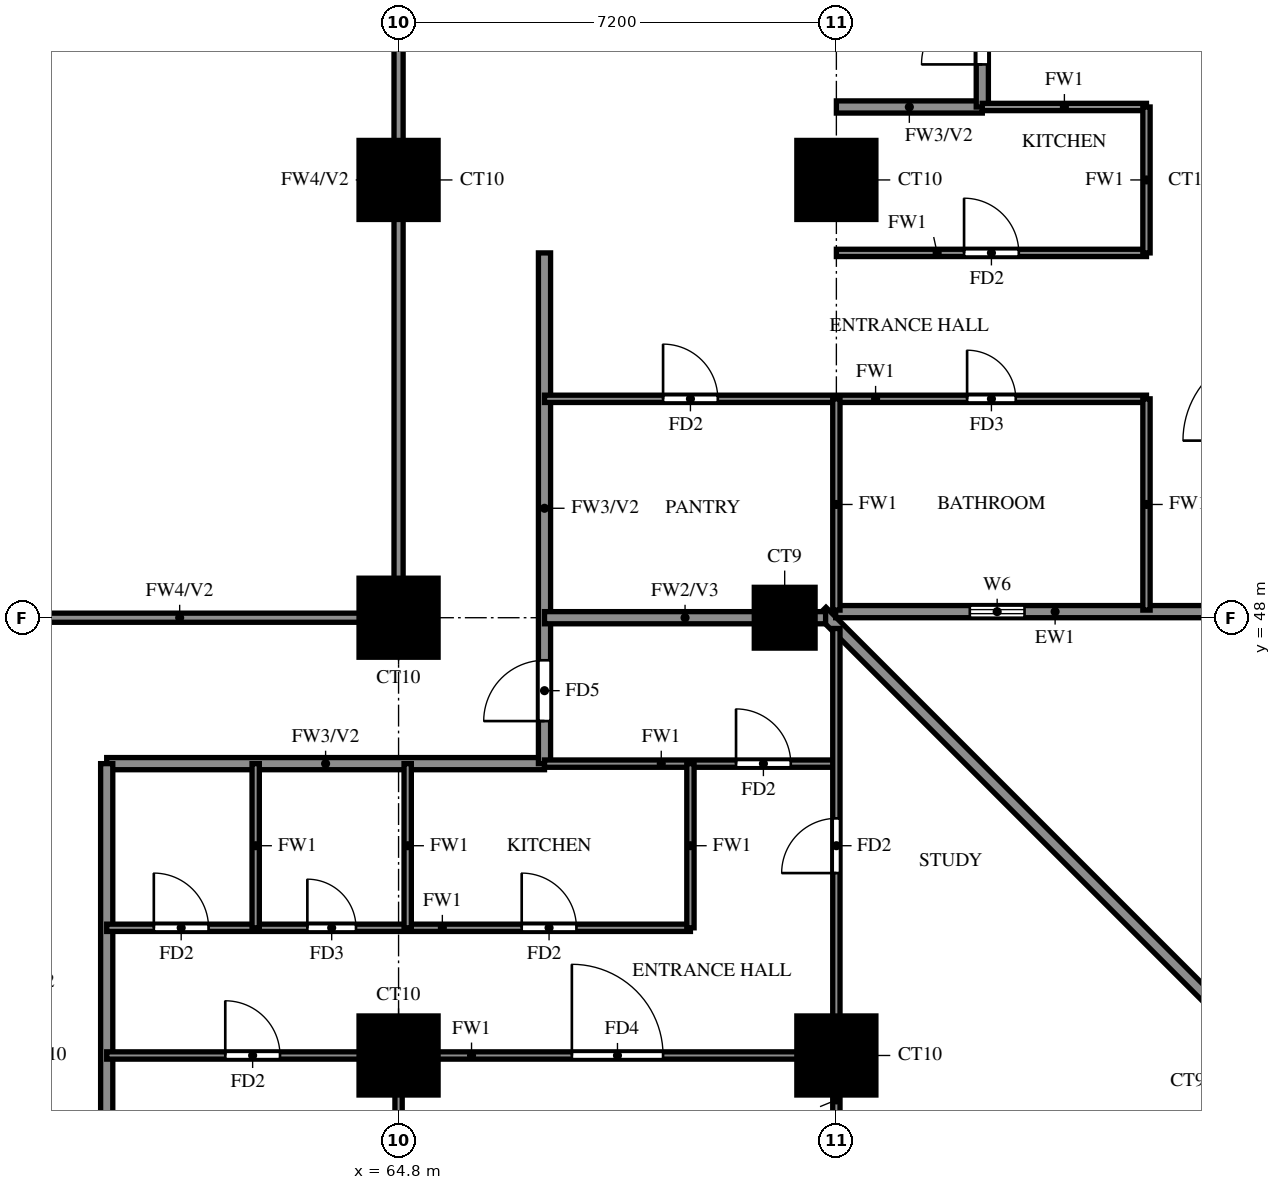
"""IFC4 building model, lengths in metres.
Left out: names, types, materials, properties, quantities, classifications, styles, units other than length and angle.
Written with IfcOpenShell. Run it as: python <this file> out.ifc"""

import sys

from ifc_helpers import new_model, si_unit, direction, frame, frame_2d, origin, origin_2d, place, context, subcontext, project, spatial, rectangle, extrude, source, transform, mapped, element, fill, save


model = new_model("IFC4")
c1 = context("Model", 3, precision=1e-05, world=origin(), true_north=direction((0.0, 1.0)))
c2 = subcontext(c1, "Body", "Model", "MODEL_VIEW")
j1 = project(units=[si_unit("LENGTHUNIT", "METRE"), si_unit("PLANEANGLEUNIT", "RADIAN")], contexts=[c1])
p1 = place(None, origin())
s1 = spatial("IfcSite", under=j1, at=p1, CompositionType="ELEMENT")
p2 = place(p1, origin())
s2 = spatial("IfcBuilding", under=s1, at=p2, CompositionType="ELEMENT")
p3 = place(p2, frame((0.0, 0.0, 83.0)))
s3 = spatial("IfcBuildingStorey", under=s2, at=p3, CompositionType="ELEMENT", Elevation=83.0)
m1 = source(origin(), c2, "Body", "SweptSolid", [
    extrude(rectangle(XDim=1.3, YDim=1.3, at=origin_2d()), origin(), (0.0, 0.0, 1.0), 3.18),
])
for number, where, z_axis, x_axis in (
    (1, (64.8, 40.8, 0.0), (0.0, 0.0, 1.0), (1.0, 0.0, 0.0)),
    (2, (72.0, 40.8, 0.0), (0.0, 0.0, 1.0), (1.0, 0.0, 0.0)),
    (3, (64.8, 48.0, 0.0), (0.0, 0.0, 1.0), (1.0, 0.0, 0.0)),
):
    element("IfcColumn", number, at=place(p3, frame(where, z_axis=z_axis, x_axis=x_axis)), inside=s3, PredefinedType="COLUMN", context=c2, shape_type="MappedRepresentation", body=[
        mapped(m1, transform((0.0, 0.0, 0.0))),
    ])
m2 = source(origin(), c2, "Body", "SweptSolid", [
    extrude(rectangle(XDim=1.0, YDim=1.0, at=origin_2d()), origin(), (0.0, 0.0, 1.0), 3.18),
])
p4 = place(p3, frame((71.15, 48.0, 0.0), z_axis=(0.0, 0.0, 1.0), x_axis=(1.0, 0.0, 0.0)))
e4 = element("IfcColumn", 4, at=p4, inside=s3, PredefinedType="COLUMN", context=c2, shape_type="MappedRepresentation", body=[
    mapped(m2, transform((0.0, 0.0, 0.0))),
])
for number, where, z_axis, x_axis in (
    (5, (64.8, 55.2, 0.0), (0.0, 0.0, 1.0), (1.0, 0.0, 0.0)),
    (6, (72.0, 55.2, 0.0), (0.0, 0.0, 1.0), (1.0, 0.0, 0.0)),
):
    element("IfcColumn", number, at=place(p3, frame(where, z_axis=z_axis, x_axis=x_axis)), inside=s3, PredefinedType="COLUMN", context=c2, shape_type="MappedRepresentation", body=[
        mapped(m1, transform((0.0, 0.0, 0.0))),
    ])
p5 = place(p3, frame((85.996, 33.863, 0.0), z_axis=(0.0, 0.0, 1.0), x_axis=(-0.707100718496, 0.707112843825, 0.0)))
e7 = element("IfcWall", 7, at=p5, inside=s3, PredefinedType="SOLIDWALL", context=c2, shape_type="SweptSolid", body=[
    extrude(rectangle(XDim=20.135, YDim=0.2, at=frame_2d((10.067, 0.0))), origin(), (0.0, 0.0, 1.0), 3.18),
])
p6 = place(p3, frame((71.989, 48.1, 0.0), z_axis=(0.0, 0.0, 1.0), x_axis=(1.0, 0.0, 0.0)))
e8 = element("IfcWall", 8, at=p6, inside=s3, PredefinedType="SOLIDWALL", context=c2, shape_type="SweptSolid", body=[
    extrude(rectangle(XDim=6.562, YDim=0.2, at=frame_2d((3.281, 0.0))), origin(), (0.0, 0.0, 1.0), 3.18),
])
p7 = place(p6, frame((2.206, 0.0, 1.5)))
e9 = element("IfcOpeningElement", 9, at=p7, cuts=e8, PredefinedType="OPENING", context=c2, shape_type="SweptSolid", body=[
    extrude(rectangle(XDim=0.9, YDim=0.9, at=frame_2d((0.45, 0.45))), frame((0.0, 0.11, 0.0), z_axis=(0.0, -1.0, 0.0), x_axis=(1.0, 0.0, 0.0)), (0.0, 0.0, 1.0), 0.22),
])
p8 = place(p3, frame((60.0, 45.6, 0.0), z_axis=(0.0, 0.0, 1.0), x_axis=(1.0, 0.0, 0.0)))
e10 = element("IfcWall", 10, at=p8, inside=s3, PredefinedType="SOLIDWALL", context=c2, shape_type="SweptSolid", body=[
    extrude(rectangle(XDim=7.2, YDim=0.2, at=frame_2d((3.6, 0.0))), origin(), (0.0, 0.0, 1.0), 3.18),
])
p9 = place(p3, frame((72.0, 56.4, 0.0), z_axis=(0.0, 0.0, 1.0), x_axis=(1.0, 0.0, 0.0)))
e11 = element("IfcWall", 11, at=p9, inside=s3, PredefinedType="SOLIDWALL", context=c2, shape_type="SweptSolid", body=[
    extrude(rectangle(XDim=2.4, YDim=0.2, at=frame_2d((1.2, 0.0))), origin(), (0.0, 0.0, 1.0), 3.18),
])
p10 = place(p3, frame((60.0, 33.725, 0.0), z_axis=(0.0, 0.0, 1.0), x_axis=(0.0, 1.0, 0.0)))
e12 = element("IfcWall", 12, at=p10, inside=s3, PredefinedType="SOLIDWALL", context=c2, shape_type="SweptSolid", body=[
    extrude(rectangle(XDim=11.875, YDim=0.2, at=frame_2d((5.938, 0.0))), origin(), (0.0, 0.0, 1.0), 2.28),
])
p11 = place(p3, frame((67.2, 45.6, 0.0), z_axis=(0.0, 0.0, 1.0), x_axis=(0.0, 1.0, 0.0)))
e13 = element("IfcWall", 13, at=p11, inside=s3, PredefinedType="SOLIDWALL", context=c2, shape_type="SweptSolid", body=[
    extrude(rectangle(XDim=8.4, YDim=0.2, at=frame_2d((4.2, 0.0))), origin(), (0.0, 0.0, 1.0), 3.18),
])
p12 = place(p11, frame((0.7, 0.0, 0.0)))
e14 = element("IfcOpeningElement", 14, at=p12, cuts=e13, PredefinedType="OPENING", context=c2, shape_type="SweptSolid", body=[
    extrude(rectangle(XDim=1.0, YDim=2.1, at=frame_2d((0.5, 1.05))), frame((0.0, 0.11, 0.0), z_axis=(0.0, -1.0, 0.0), x_axis=(1.0, 0.0, 0.0)), (0.0, 0.0, 1.0), 0.22),
])
p13 = place(p3, frame((74.4, 56.4, 0.0), z_axis=(0.0, 0.0, 1.0), x_axis=(0.0, 1.0, 0.0)))
e15 = element("IfcWall", 15, at=p13, inside=s3, PredefinedType="SOLIDWALL", context=c2, shape_type="SweptSolid", body=[
    extrude(rectangle(XDim=9.6, YDim=0.2, at=frame_2d((4.8, 0.0))), origin(), (0.0, 0.0, 1.0), 3.18),
])
p14 = place(p13, frame((0.7, 0.0, 0.0)))
e16 = element("IfcOpeningElement", 16, at=p14, cuts=e15, PredefinedType="OPENING", context=c2, shape_type="SweptSolid", body=[
    extrude(rectangle(XDim=1.0, YDim=2.1, at=frame_2d((0.5, 1.05))), frame((0.0, 0.11, 0.0), z_axis=(0.0, -1.0, 0.0), x_axis=(1.0, 0.0, 0.0)), (0.0, 0.0, 1.0), 0.22),
])
p15 = place(p13, frame((3.1, 0.0, 0.0)))
e17 = element("IfcOpeningElement", 17, at=p15, cuts=e15, PredefinedType="OPENING", context=c2, shape_type="SweptSolid", body=[
    extrude(rectangle(XDim=1.0, YDim=2.1, at=frame_2d((0.5, 1.05))), frame((0.0, 0.11, 0.0), z_axis=(0.0, -1.0, 0.0), x_axis=(1.0, 0.0, 0.0)), (0.0, 0.0, 1.0), 0.22),
])
p16 = place(p3, frame((67.2, 48.0, 0.0), z_axis=(0.0, 0.0, 1.0), x_axis=(1.0, 0.0, 0.0)))
e18 = element("IfcWall", 18, at=p16, inside=s3, PredefinedType="SOLIDWALL", context=c2, shape_type="SweptSolid", body=[
    extrude(rectangle(XDim=4.623, YDim=0.2, at=frame_2d((2.312, 0.0))), origin(), (0.0, 0.0, 1.0), 3.18),
])
p17 = place(p3, frame((60.0, 40.8, 0.0), z_axis=(0.0, 0.0, 1.0), x_axis=(1.0, 0.0, 0.0)))
e19 = element("IfcWall", 19, at=p17, inside=s3, PredefinedType="PARTITIONING", context=c2, shape_type="SweptSolid", body=[
    extrude(rectangle(XDim=12.0, YDim=0.12, at=frame_2d((6.0, 0.0))), origin(), (0.0, 0.0, 1.0), 3.18),
])
p18 = place(p17, frame((7.65, 0.0, 0.0)))
e20 = element("IfcOpeningElement", 20, at=p18, cuts=e19, PredefinedType="OPENING", context=c2, shape_type="SweptSolid", body=[
    extrude(rectangle(XDim=1.5, YDim=2.1, at=frame_2d((0.75, 1.05))), frame((0.0, 0.07, 0.0), z_axis=(0.0, -1.0, 0.0), x_axis=(1.0, 0.0, 0.0)), (0.0, 0.0, 1.0), 0.14),
])
p19 = place(p17, frame((1.95, 0.0, 0.0)))
e21 = element("IfcOpeningElement", 21, at=p19, cuts=e19, PredefinedType="OPENING", context=c2, shape_type="SweptSolid", body=[
    extrude(rectangle(XDim=0.9, YDim=2.1, at=frame_2d((0.45, 1.05))), frame((0.0, 0.07, 0.0), z_axis=(0.0, -1.0, 0.0), x_axis=(1.0, 0.0, 0.0)), (0.0, 0.0, 1.0), 0.14),
])
p20 = place(p3, frame((60.0, 42.9, 0.0), z_axis=(0.0, 0.0, 1.0), x_axis=(1.0, 0.0, 0.0)))
e22 = element("IfcWall", 22, at=p20, inside=s3, PredefinedType="PARTITIONING", context=c2, shape_type="SweptSolid", body=[
    extrude(rectangle(XDim=9.6, YDim=0.12, at=frame_2d((4.8, 0.0))), origin(), (0.0, 0.0, 1.0), 3.18),
])
p21 = place(p20, frame((6.825, 0.0, 0.0)))
e23 = element("IfcOpeningElement", 23, at=p21, cuts=e22, PredefinedType="OPENING", context=c2, shape_type="SweptSolid", body=[
    extrude(rectangle(XDim=0.9, YDim=2.1, at=frame_2d((0.45, 1.05))), frame((0.0, 0.07, 0.0), z_axis=(0.0, -1.0, 0.0), x_axis=(1.0, 0.0, 0.0)), (0.0, 0.0, 1.0), 0.14),
])
p22 = place(p20, frame((3.3, 0.0, 0.0)))
e24 = element("IfcOpeningElement", 24, at=p22, cuts=e22, PredefinedType="OPENING", context=c2, shape_type="SweptSolid", body=[
    extrude(rectangle(XDim=0.8, YDim=2.1, at=frame_2d((0.4, 1.05))), frame((0.0, 0.07, 0.0), z_axis=(0.0, -1.0, 0.0), x_axis=(1.0, 0.0, 0.0)), (0.0, 0.0, 1.0), 0.14),
])
p23 = place(p20, frame((0.775, 0.0, 0.0)))
e25 = element("IfcOpeningElement", 25, at=p23, cuts=e22, PredefinedType="OPENING", context=c2, shape_type="SweptSolid", body=[
    extrude(rectangle(XDim=0.9, YDim=2.1, at=frame_2d((0.45, 1.05))), frame((0.0, 0.07, 0.0), z_axis=(0.0, -1.0, 0.0), x_axis=(1.0, 0.0, 0.0)), (0.0, 0.0, 1.0), 0.14),
])
p24 = place(p3, frame((67.2, 45.6, 0.0), z_axis=(0.0, 0.0, 1.0), x_axis=(1.0, 0.0, 0.0)))
e26 = element("IfcWall", 26, at=p24, inside=s3, PredefinedType="PARTITIONING", context=c2, shape_type="SweptSolid", body=[
    extrude(rectangle(XDim=4.8, YDim=0.12, at=frame_2d((2.4, 0.0))), origin(), (0.0, 0.0, 1.0), 3.18),
])
p25 = place(p24, frame((3.15, 0.0, 0.0)))
e27 = element("IfcOpeningElement", 27, at=p25, cuts=e26, PredefinedType="OPENING", context=c2, shape_type="SweptSolid", body=[
    extrude(rectangle(XDim=0.9, YDim=2.1, at=frame_2d((0.45, 1.05))), frame((0.0, 0.07, 0.0), z_axis=(0.0, -1.0, 0.0), x_axis=(1.0, 0.0, 0.0)), (0.0, 0.0, 1.0), 0.14),
])
p26 = place(p3, frame((67.2, 51.6, 0.0), z_axis=(0.0, 0.0, 1.0), x_axis=(1.0, 0.0, 0.0)))
e28 = element("IfcWall", 28, at=p26, inside=s3, PredefinedType="PARTITIONING", context=c2, shape_type="SweptSolid", body=[
    extrude(rectangle(XDim=9.9, YDim=0.12, at=frame_2d((4.95, 0.0))), origin(), (0.0, 0.0, 1.0), 3.18),
])
p27 = place(p26, frame((6.95, 0.0, 0.0)))
e29 = element("IfcOpeningElement", 29, at=p27, cuts=e28, PredefinedType="OPENING", context=c2, shape_type="SweptSolid", body=[
    extrude(rectangle(XDim=0.8, YDim=2.1, at=frame_2d((0.4, 1.05))), frame((0.0, 0.07, 0.0), z_axis=(0.0, -1.0, 0.0), x_axis=(1.0, 0.0, 0.0)), (0.0, 0.0, 1.0), 0.14),
])
p28 = place(p26, frame((1.95, 0.0, 0.0)))
e30 = element("IfcOpeningElement", 30, at=p28, cuts=e28, PredefinedType="OPENING", context=c2, shape_type="SweptSolid", body=[
    extrude(rectangle(XDim=0.9, YDim=2.1, at=frame_2d((0.45, 1.05))), frame((0.0, 0.07, 0.0), z_axis=(0.0, -1.0, 0.0), x_axis=(1.0, 0.0, 0.0)), (0.0, 0.0, 1.0), 0.14),
])
p29 = place(p3, frame((72.0, 54.0, 0.0), z_axis=(0.0, 0.0, 1.0), x_axis=(1.0, 0.0, 0.0)))
e31 = element("IfcWall", 31, at=p29, inside=s3, PredefinedType="PARTITIONING", context=c2, shape_type="SweptSolid", body=[
    extrude(rectangle(XDim=5.1, YDim=0.12, at=frame_2d((2.55, 0.0))), origin(), (0.0, 0.0, 1.0), 3.18),
])
p30 = place(p29, frame((2.1, 0.0, 0.0)))
e32 = element("IfcOpeningElement", 32, at=p30, cuts=e31, PredefinedType="OPENING", context=c2, shape_type="SweptSolid", body=[
    extrude(rectangle(XDim=0.9, YDim=2.1, at=frame_2d((0.45, 1.05))), frame((0.0, 0.07, 0.0), z_axis=(0.0, -1.0, 0.0), x_axis=(1.0, 0.0, 0.0)), (0.0, 0.0, 1.0), 0.14),
])
for number, where, z_axis, x_axis in (
    (33, (74.4, 56.4, 0.0), (0.0, 0.0, 1.0), (1.0, 0.0, 0.0)),
    (34, (62.45, 42.9, 0.0), (0.0, 0.0, 1.0), (0.0, 1.0, 0.0)),
):
    element("IfcWall", number, at=place(p3, frame(where, z_axis=z_axis, x_axis=x_axis)), inside=s3, PredefinedType="PARTITIONING", context=c2, shape_type="SweptSolid", body=[
        extrude(rectangle(XDim=2.7, YDim=0.12, at=frame_2d((1.35, 0.0))), origin(), (0.0, 0.0, 1.0), 3.18),
    ])
p31 = place(p3, frame((64.8, 33.725, 0.0), z_axis=(0.0, 0.0, 1.0), x_axis=(0.0, 1.0, 0.0)))
e35 = element("IfcWall", 35, at=p31, inside=s3, PredefinedType="PARTITIONING", context=c2, shape_type="SweptSolid", body=[
    extrude(rectangle(XDim=7.075, YDim=0.12, at=frame_2d((3.538, 0.0))), origin(), (0.0, 0.0, 1.0), 3.18),
])
for number, where, z_axis, x_axis in (
    (36, (64.95, 42.9, 0.0), (0.0, 0.0, 1.0), (0.0, 1.0, 0.0)),
    (37, (69.6, 42.9, 0.0), (0.0, 0.0, 1.0), (0.0, 1.0, 0.0)),
):
    element("IfcWall", number, at=place(p3, frame(where, z_axis=z_axis, x_axis=x_axis)), inside=s3, PredefinedType="PARTITIONING", context=c2, shape_type="SweptSolid", body=[
        extrude(rectangle(XDim=2.7, YDim=0.12, at=frame_2d((1.35, 0.0))), origin(), (0.0, 0.0, 1.0), 3.18),
    ])
p32 = place(p3, frame((72.0, 33.725, 0.0), z_axis=(0.0, 0.0, 1.0), x_axis=(0.0, 1.0, 0.0)))
e38 = element("IfcWall", 38, at=p32, inside=s3, PredefinedType="PARTITIONING", context=c2, shape_type="SweptSolid", body=[
    extrude(rectangle(XDim=14.098, YDim=0.12, at=frame_2d((7.049, 0.0))), origin(), (0.0, 0.0, 1.0), 2.28),
])
p33 = place(p32, frame((10.075, 0.0, 0.0)))
e39 = element("IfcOpeningElement", 39, at=p33, cuts=e38, PredefinedType="OPENING", context=c2, shape_type="SweptSolid", body=[
    extrude(rectangle(XDim=0.9, YDim=2.1, at=frame_2d((0.45, 1.05))), frame((0.0, 0.07, 0.0), z_axis=(0.0, -1.0, 0.0), x_axis=(1.0, 0.0, 0.0)), (0.0, 0.0, 1.0), 0.14),
])
for number, where, z_axis, x_axis in (
    (40, (72.0, 48.125, 0.0), (0.0, 0.0, 1.0), (0.0, 1.0, 0.0)),
    (41, (77.1, 48.125, 0.0), (0.0, 0.0, 1.0), (0.0, 1.0, 0.0)),
):
    element("IfcWall", number, at=place(p3, frame(where, z_axis=z_axis, x_axis=x_axis)), inside=s3, PredefinedType="PARTITIONING", context=c2, shape_type="SweptSolid", body=[
        extrude(rectangle(XDim=3.475, YDim=0.12, at=frame_2d((1.738, 0.0))), origin(), (0.0, 0.0, 1.0), 3.18),
    ])
p34 = place(p3, frame((77.1, 54.0, 0.0), z_axis=(0.0, 0.0, 1.0), x_axis=(0.0, 1.0, 0.0)))
e42 = element("IfcWall", 42, at=p34, inside=s3, PredefinedType="PARTITIONING", context=c2, shape_type="SweptSolid", body=[
    extrude(rectangle(XDim=2.4, YDim=0.12, at=frame_2d((1.2, 0.0))), origin(), (0.0, 0.0, 1.0), 3.18),
])
p35 = place(p3, frame((57.6, 48.0, 0.0), z_axis=(0.0, 0.0, 1.0), x_axis=(1.0, 0.0, 0.0)))
e43 = element("IfcWall", 43, at=p35, inside=s3, PredefinedType="SOLIDWALL", context=c2, shape_type="SweptSolid", body=[
    extrude(rectangle(XDim=7.2, YDim=0.15, at=frame_2d((3.6, 0.0))), origin(), (0.0, 0.0, 1.0), 2.28),
])
p36 = place(p3, frame((64.8, 48.0, 0.0), z_axis=(0.0, 0.0, 1.0), x_axis=(0.0, 1.0, 0.0)))
e44 = element("IfcWall", 44, at=p36, inside=s3, PredefinedType="SOLIDWALL", context=c2, shape_type="SweptSolid", body=[
    extrude(rectangle(XDim=14.4, YDim=0.15, at=frame_2d((7.2, 0.0))), origin(), (0.0, 0.0, 1.0), 2.28),
])
p37 = place(p7, origin())
e45 = element("IfcWindow", 45, at=p37, inside=s3, PartitioningType="SINGLE_PANEL", PredefinedType="WINDOW", context=c2, shape_type="SweptSolid", body=[
    extrude(rectangle(XDim=0.9, YDim=0.9, at=frame_2d((0.45, 0.45))), frame((0.0, 0.03, 0.0), z_axis=(0.0, -1.0, 0.0), x_axis=(1.0, 0.0, 0.0)), (0.0, 0.0, 1.0), 0.06),
])
fill(e9, e45)
p38 = place(p14, origin())
e46 = element("IfcDoor", 46, at=p38, inside=s3, OperationType="SINGLE_SWING_LEFT", PredefinedType="DOOR", context=c2, shape_type="SweptSolid", body=[
    extrude(rectangle(XDim=1.0, YDim=2.1, at=frame_2d((0.5, 1.05))), frame((0.0, 0.025, 0.0), z_axis=(0.0, -1.0, 0.0), x_axis=(1.0, 0.0, 0.0)), (0.0, 0.0, 1.0), 0.05),
])
fill(e16, e46)
p39 = place(p27, origin())
e47 = element("IfcDoor", 47, at=p39, inside=s3, OperationType="SINGLE_SWING_LEFT", PredefinedType="DOOR", context=c2, shape_type="SweptSolid", body=[
    extrude(rectangle(XDim=0.8, YDim=2.1, at=frame_2d((0.4, 1.05))), frame((0.0, 0.025, 0.0), z_axis=(0.0, -1.0, 0.0), x_axis=(1.0, 0.0, 0.0)), (0.0, 0.0, 1.0), 0.05),
])
fill(e29, e47)
p40 = place(p30, origin())
e48 = element("IfcDoor", 48, at=p40, inside=s3, OperationType="SINGLE_SWING_RIGHT", PredefinedType="DOOR", context=c2, shape_type="SweptSolid", body=[
    extrude(rectangle(XDim=0.9, YDim=2.1, at=frame_2d((0.45, 1.05))), frame((0.0, 0.025, 0.0), z_axis=(0.0, -1.0, 0.0), x_axis=(1.0, 0.0, 0.0)), (0.0, 0.0, 1.0), 0.05),
])
fill(e32, e48)
p41 = place(p28, origin())
e49 = element("IfcDoor", 49, at=p41, inside=s3, OperationType="SINGLE_SWING_LEFT", PredefinedType="DOOR", context=c2, shape_type="SweptSolid", body=[
    extrude(rectangle(XDim=0.9, YDim=2.1, at=frame_2d((0.45, 1.05))), frame((0.0, 0.025, 0.0), z_axis=(0.0, -1.0, 0.0), x_axis=(1.0, 0.0, 0.0)), (0.0, 0.0, 1.0), 0.05),
])
fill(e30, e49)
p42 = place(p25, origin())
e50 = element("IfcDoor", 50, at=p42, inside=s3, OperationType="SINGLE_SWING_LEFT", PredefinedType="DOOR", context=c2, shape_type="SweptSolid", body=[
    extrude(rectangle(XDim=0.9, YDim=2.1, at=frame_2d((0.45, 1.05))), frame((0.0, 0.025, 0.0), z_axis=(0.0, -1.0, 0.0), x_axis=(1.0, 0.0, 0.0)), (0.0, 0.0, 1.0), 0.05),
])
fill(e27, e50)
p43 = place(p12, origin())
e51 = element("IfcDoor", 51, at=p43, inside=s3, OperationType="SINGLE_SWING_RIGHT", PredefinedType="DOOR", context=c2, shape_type="SweptSolid", body=[
    extrude(rectangle(XDim=1.0, YDim=2.1, at=frame_2d((0.5, 1.05))), frame((0.0, 0.025, 0.0), z_axis=(0.0, -1.0, 0.0), x_axis=(1.0, 0.0, 0.0)), (0.0, 0.0, 1.0), 0.05),
])
fill(e14, e51)
p44 = place(p18, origin())
e52 = element("IfcDoor", 52, at=p44, inside=s3, OperationType="SINGLE_SWING_LEFT", PredefinedType="DOOR", context=c2, shape_type="SweptSolid", body=[
    extrude(rectangle(XDim=1.5, YDim=2.1, at=frame_2d((0.75, 1.05))), frame((0.0, 0.025, 0.0), z_axis=(0.0, -1.0, 0.0), x_axis=(1.0, 0.0, 0.0)), (0.0, 0.0, 1.0), 0.05),
])
fill(e20, e52)
p45 = place(p19, origin())
e53 = element("IfcDoor", 53, at=p45, inside=s3, OperationType="SINGLE_SWING_LEFT", PredefinedType="DOOR", context=c2, shape_type="SweptSolid", body=[
    extrude(rectangle(XDim=0.9, YDim=2.1, at=frame_2d((0.45, 1.05))), frame((0.0, 0.025, 0.0), z_axis=(0.0, -1.0, 0.0), x_axis=(1.0, 0.0, 0.0)), (0.0, 0.0, 1.0), 0.05),
])
fill(e21, e53)
p46 = place(p21, origin())
e54 = element("IfcDoor", 54, at=p46, inside=s3, OperationType="SINGLE_SWING_RIGHT", PredefinedType="DOOR", context=c2, shape_type="SweptSolid", body=[
    extrude(rectangle(XDim=0.9, YDim=2.1, at=frame_2d((0.45, 1.05))), frame((0.0, 0.025, 0.0), z_axis=(0.0, -1.0, 0.0), x_axis=(1.0, 0.0, 0.0)), (0.0, 0.0, 1.0), 0.05),
])
fill(e23, e54)
p47 = place(p22, origin())
e55 = element("IfcDoor", 55, at=p47, inside=s3, OperationType="SINGLE_SWING_LEFT", PredefinedType="DOOR", context=c2, shape_type="SweptSolid", body=[
    extrude(rectangle(XDim=0.8, YDim=2.1, at=frame_2d((0.4, 1.05))), frame((0.0, 0.025, 0.0), z_axis=(0.0, -1.0, 0.0), x_axis=(1.0, 0.0, 0.0)), (0.0, 0.0, 1.0), 0.05),
])
fill(e24, e55)
p48 = place(p23, origin())
e56 = element("IfcDoor", 56, at=p48, inside=s3, OperationType="SINGLE_SWING_LEFT", PredefinedType="DOOR", context=c2, shape_type="SweptSolid", body=[
    extrude(rectangle(XDim=0.9, YDim=2.1, at=frame_2d((0.45, 1.05))), frame((0.0, 0.025, 0.0), z_axis=(0.0, -1.0, 0.0), x_axis=(1.0, 0.0, 0.0)), (0.0, 0.0, 1.0), 0.05),
])
fill(e25, e56)
p49 = place(p33, origin())
e57 = element("IfcDoor", 57, at=p49, inside=s3, OperationType="SINGLE_SWING_RIGHT", PredefinedType="DOOR", context=c2, shape_type="SweptSolid", body=[
    extrude(rectangle(XDim=0.9, YDim=2.1, at=frame_2d((0.45, 1.05))), frame((0.0, 0.025, 0.0), z_axis=(0.0, -1.0, 0.0), x_axis=(1.0, 0.0, 0.0)), (0.0, 0.0, 1.0), 0.05),
])
fill(e39, e57)
save(model, sys.argv[1])
